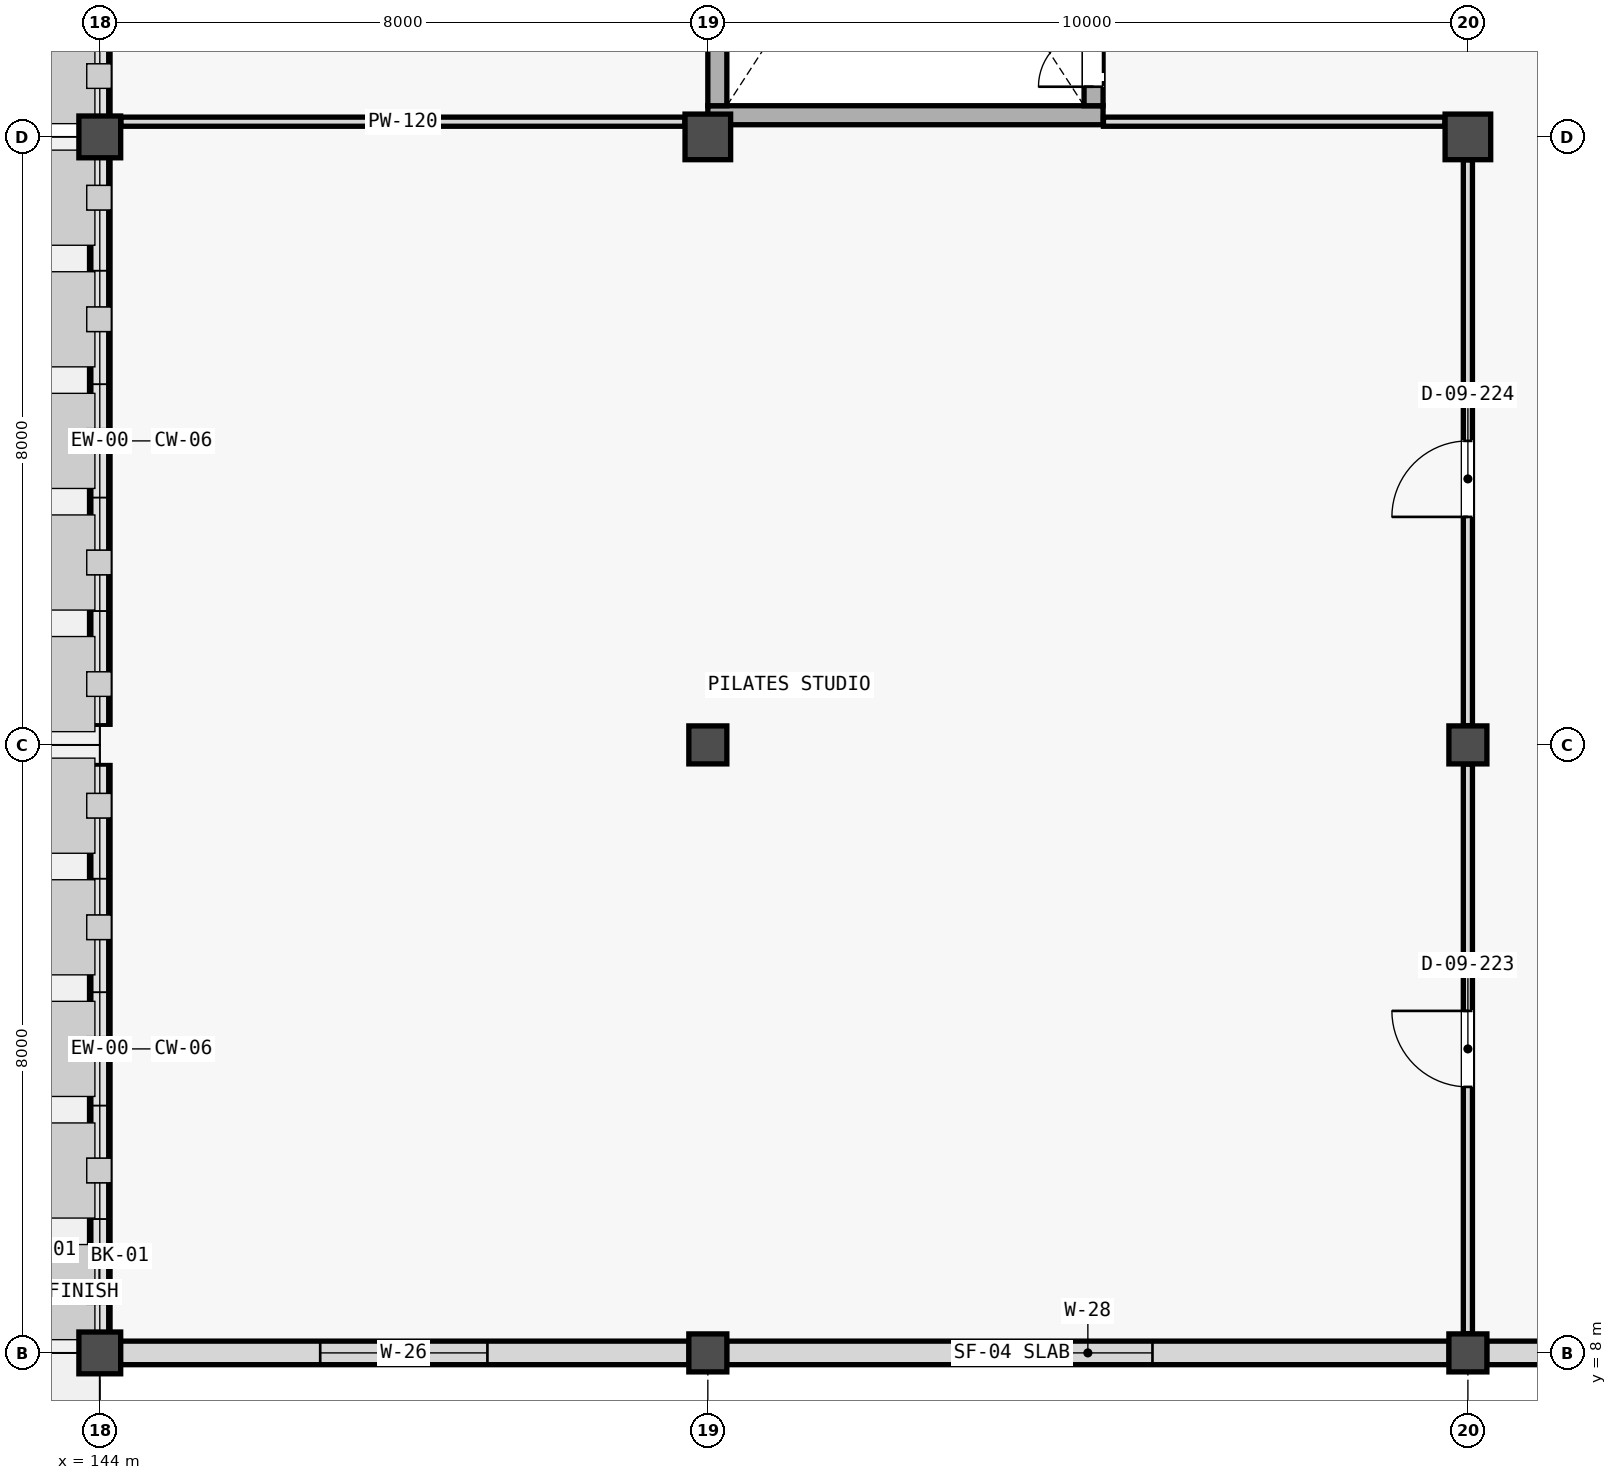
"""IFC4 building model, lengths in metres.
Left out: names, types, materials, properties, quantities, classifications, styles, units other than length and angle.
Written with IfcOpenShell. Run it as: python <this file> out.ifc"""

import sys

from ifc_helpers import new_model, si_unit, direction, frame, frame_2d, origin, origin_2d, place, context, subcontext, project, spatial, rectangle, extrude, element, fill, save


model = new_model("IFC4")
c1 = context("Model", 3, precision=1e-05, world=origin(), true_north=direction((0.0, 1.0)))
c2 = subcontext(c1, "Body", "Model", "MODEL_VIEW")
j1 = project(units=[si_unit("LENGTHUNIT", "METRE"), si_unit("PLANEANGLEUNIT", "RADIAN")], contexts=[c1])
p1 = place(None, origin())
s1 = spatial("IfcSite", under=j1, at=p1, CompositionType="ELEMENT")
p2 = place(p1, origin())
s2 = spatial("IfcBuilding", under=s1, at=p2, CompositionType="ELEMENT")
p3 = place(p2, frame((0.0, 0.0, 10.2)))
s3 = spatial("IfcBuildingStorey", under=s2, at=p3, CompositionType="ELEMENT", Elevation=10.2)
for number, where, z_axis, x_axis in (
    (1, (152.0, 8.0, 0.0), (0.0, 0.0, 1.0), (1.0, 0.0, 0.0)),
    (2, (162.0, 8.0, 0.0), (0.0, 0.0, 1.0), (1.0, 0.0, 0.0)),
):
    element("IfcColumn", number, at=place(p3, frame(where, z_axis=z_axis, x_axis=x_axis)), inside=s3, PredefinedType="COLUMN", context=c2, shape_type="SweptSolid", body=[
        extrude(rectangle(XDim=0.5, YDim=0.5, at=origin_2d()), origin(), (0.0, 0.0, 1.0), 3.99),
    ])
for number, where, z_axis, x_axis in (
    (3, (152.0, 16.0, 0.0), (0.0, 0.0, 1.0), (1.0, 0.0, 0.0)),
    (4, (162.0, 16.0, 0.0), (0.0, 0.0, 1.0), (1.0, 0.0, 0.0)),
):
    element("IfcColumn", number, at=place(p3, frame(where, z_axis=z_axis, x_axis=x_axis)), inside=s3, PredefinedType="COLUMN", context=c2, shape_type="SweptSolid", body=[
        extrude(rectangle(XDim=0.5, YDim=0.5, at=origin_2d()), origin(), (0.0, 0.0, 1.0), 3.96),
    ])
for number, where, z_axis, x_axis in (
    (5, (152.0, 24.0, 0.0), (0.0, 0.0, 1.0), (1.0, 0.0, 0.0)),
    (6, (162.0, 24.0, 0.0), (0.0, 0.0, 1.0), (1.0, 0.0, 0.0)),
):
    element("IfcColumn", number, at=place(p3, frame(where, z_axis=z_axis, x_axis=x_axis)), inside=s3, PredefinedType="COLUMN", context=c2, shape_type="SweptSolid", body=[
        extrude(rectangle(XDim=0.6, YDim=0.6, at=origin_2d()), origin(), (0.0, 0.0, 1.0), 3.96),
    ])
p4 = place(p3, frame((144.0, 8.0, 0.0), z_axis=(0.0, 0.0, 1.0), x_axis=(1.0, 0.0, 0.0)))
e7 = element("IfcColumn", 7, at=p4, inside=s3, PredefinedType="COLUMN", context=c2, shape_type="SweptSolid", body=[
    extrude(rectangle(XDim=0.55, YDim=0.55, at=origin_2d()), origin(), (0.0, 0.0, 1.0), 3.99),
])
p5 = place(p3, frame((144.0, 24.0, 0.0), z_axis=(0.0, 0.0, 1.0), x_axis=(1.0, 0.0, 0.0)))
e8 = element("IfcColumn", 8, at=p5, inside=s3, PredefinedType="COLUMN", context=c2, shape_type="SweptSolid", body=[
    extrude(rectangle(XDim=0.55, YDim=0.55, at=origin_2d()), origin(), (0.0, 0.0, 1.0), 3.96),
])
for number, where, z_axis, x_axis in (
    (9, (144.0, 8.271, 0.0), (0.0, 0.0, 1.0), (0.0, 1.0, 0.0)),
    (10, (144.0, 16.271, 0.0), (0.0, 0.0, 1.0), (0.0, 1.0, 0.0)),
):
    element("IfcWall", number, at=place(p3, frame(where, z_axis=z_axis, x_axis=x_axis)), inside=s3, PredefinedType="STANDARD", context=c2, shape_type="SweptSolid", body=[
        extrude(rectangle(XDim=7.458, YDim=0.27, at=frame_2d((3.729, 0.0))), origin(), (0.0, 0.0, 1.0), 0.8),
    ])
p6 = place(p3, frame((144.0, 24.271, 0.0), z_axis=(0.0, 0.0, 1.0), x_axis=(0.0, 1.0, 0.0)))
e11 = element("IfcWall", 11, at=p6, inside=s3, PredefinedType="STANDARD", context=c2, shape_type="SweptSolid", body=[
    extrude(rectangle(XDim=7.483, YDim=0.27, at=frame_2d((3.741, 0.0))), origin(), (0.0, 0.0, 1.0), 0.8),
])
p7 = place(p3, frame((144.271, 8.0, 0.0), z_axis=(0.0, 0.0, 1.0), x_axis=(1.0, 0.0, 0.0)))
e12 = element("IfcWall", 12, at=p7, inside=s3, PredefinedType="STANDARD", context=c2, shape_type="SweptSolid", body=[
    extrude(rectangle(XDim=7.483, YDim=0.31, at=frame_2d((3.741, 0.0))), origin(), (0.0, 0.0, 1.0), 3.15),
])
p8 = place(p7, frame((2.629, 0.0, 0.95)))
e13 = element("IfcOpeningElement", 13, at=p8, cuts=e12, PredefinedType="OPENING", context=c2, shape_type="SweptSolid", body=[
    extrude(rectangle(XDim=2.2, YDim=1.6, at=frame_2d((1.1, 0.8))), frame((0.0, 0.165, 0.0), z_axis=(0.0, -1.0, 0.0), x_axis=(1.0, 0.0, 0.0)), (0.0, 0.0, 1.0), 0.33),
])
p9 = place(p3, frame((152.246, 8.0, 0.0), z_axis=(0.0, 0.0, 1.0), x_axis=(1.0, 0.0, 0.0)))
e14 = element("IfcWall", 14, at=p9, inside=s3, PredefinedType="STANDARD", context=c2, shape_type="SweptSolid", body=[
    extrude(rectangle(XDim=9.508, YDim=0.31, at=frame_2d((4.754, 0.0))), origin(), (0.0, 0.0, 1.0), 3.15),
])
p10 = place(p9, frame((3.904, 0.0, 0.95)))
e15 = element("IfcOpeningElement", 15, at=p10, cuts=e14, PredefinedType="OPENING", context=c2, shape_type="SweptSolid", body=[
    extrude(rectangle(XDim=1.7, YDim=1.35, at=frame_2d((0.85, 0.675))), frame((0.0, 0.165, 0.0), z_axis=(0.0, -1.0, 0.0), x_axis=(1.0, 0.0, 0.0)), (0.0, 0.0, 1.0), 0.33),
])
p11 = place(p3, frame((162.246, 8.0, 0.0), z_axis=(0.0, 0.0, 1.0), x_axis=(1.0, 0.0, 0.0)))
e16 = element("IfcWall", 16, at=p11, inside=s3, PredefinedType="STANDARD", context=c2, shape_type="SweptSolid", body=[
    extrude(rectangle(XDim=5.774, YDim=0.31, at=frame_2d((2.887, 0.0))), origin(), (0.0, 0.0, 1.0), 3.15),
])
p12 = place(p11, frame((0.784, 0.0, 0.95)))
e17 = element("IfcOpeningElement", 17, at=p12, cuts=e16, PredefinedType="OPENING", context=c2, shape_type="SweptSolid", body=[
    extrude(rectangle(XDim=1.0, YDim=1.6, at=frame_2d((0.5, 0.8))), frame((0.0, 0.165, 0.0), z_axis=(0.0, -1.0, 0.0), x_axis=(1.0, 0.0, 0.0)), (0.0, 0.0, 1.0), 0.33),
])
p13 = place(p3, frame((152.0, 24.285, 0.0), z_axis=(0.0, 0.0, 1.0), x_axis=(1.0, 0.0, 0.0)))
e18 = element("IfcWall", 18, at=p13, inside=s3, PredefinedType="SHEAR", context=c2, shape_type="SweptSolid", body=[
    extrude(rectangle(XDim=5.2, YDim=0.25, at=frame_2d((2.6, 0.0))), origin(), (0.0, 0.0, 1.0), 4.2),
])
p14 = place(p3, frame((152.125, 24.41, 0.0), z_axis=(0.0, 0.0, 1.0), x_axis=(0.0, 1.0, 0.0)))
e19 = element("IfcWall", 19, at=p14, inside=s3, PredefinedType="SHEAR", context=c2, shape_type="SweptSolid", body=[
    extrude(rectangle(XDim=7.24, YDim=0.25, at=frame_2d((3.62, 0.0))), origin(), (0.0, 0.0, 1.0), 4.2),
])
p15 = place(p3, frame((157.075, 24.41, 0.0), z_axis=(0.0, 0.0, 1.0), x_axis=(0.0, 1.0, 0.0)))
e20 = element("IfcWall", 20, at=p15, inside=s3, PredefinedType="SHEAR", context=c2, shape_type="SweptSolid", body=[
    extrude(rectangle(XDim=7.24, YDim=0.25, at=frame_2d((3.62, 0.0))), origin(), (0.0, 0.0, 1.0), 4.2),
])
p16 = place(p15, frame((0.25, 0.0, 0.0)))
e21 = element("IfcOpeningElement", 21, at=p16, cuts=e20, PredefinedType="OPENING", context=c2, shape_type="SweptSolid", body=[
    extrude(rectangle(XDim=1.45, YDim=2.2, at=frame_2d((0.725, 1.1))), frame((0.0, 0.135, 0.0), z_axis=(0.0, -1.0, 0.0), x_axis=(1.0, 0.0, 0.0)), (0.0, 0.0, 1.0), 0.27),
])
p17 = place(p3, frame((162.0, 8.252, 0.0), z_axis=(0.0, 0.0, 1.0), x_axis=(0.0, 1.0, 0.0)))
e22 = element("IfcWall", 22, at=p17, inside=s3, PredefinedType="PARTITIONING", context=c2, shape_type="SweptSolid", body=[
    extrude(rectangle(XDim=7.496, YDim=0.12, at=frame_2d((3.748, 0.0))), origin(), (0.0, 0.0, 1.0), 3.24),
])
p18 = place(p17, frame((3.248, 0.0, 0.0)))
e23 = element("IfcOpeningElement", 23, at=p18, cuts=e22, PredefinedType="OPENING", context=c2, shape_type="SweptSolid", body=[
    extrude(rectangle(XDim=1.0, YDim=2.15, at=frame_2d((0.5, 1.075))), frame((0.0, 0.07, 0.0), z_axis=(0.0, -1.0, 0.0), x_axis=(1.0, 0.0, 0.0)), (0.0, 0.0, 1.0), 0.14),
])
p19 = place(p3, frame((162.0, 16.252, 0.0), z_axis=(0.0, 0.0, 1.0), x_axis=(0.0, 1.0, 0.0)))
e24 = element("IfcWall", 24, at=p19, inside=s3, PredefinedType="PARTITIONING", context=c2, shape_type="SweptSolid", body=[
    extrude(rectangle(XDim=7.446, YDim=0.12, at=frame_2d((3.723, 0.0))), origin(), (0.0, 0.0, 1.0), 3.24),
])
p20 = place(p19, frame((2.748, 0.0, 0.0)))
e25 = element("IfcOpeningElement", 25, at=p20, cuts=e24, PredefinedType="OPENING", context=c2, shape_type="SweptSolid", body=[
    extrude(rectangle(XDim=1.0, YDim=2.15, at=frame_2d((0.5, 1.075))), frame((0.0, 0.07, 0.0), z_axis=(0.0, -1.0, 0.0), x_axis=(1.0, 0.0, 0.0)), (0.0, 0.0, 1.0), 0.14),
])
p21 = place(p3, frame((144.277, 24.2, 0.0), z_axis=(0.0, 0.0, 1.0), x_axis=(1.0, 0.0, 0.0)))
e26 = element("IfcWall", 26, at=p21, inside=s3, PredefinedType="PARTITIONING", context=c2, shape_type="SweptSolid", body=[
    extrude(rectangle(XDim=7.421, YDim=0.12, at=frame_2d((3.71, 0.0))), origin(), (0.0, 0.0, 1.0), 3.945),
])
p22 = place(p3, frame((157.205, 24.2, 0.0), z_axis=(0.0, 0.0, 1.0), x_axis=(1.0, 0.0, 0.0)))
e27 = element("IfcWall", 27, at=p22, inside=s3, PredefinedType="PARTITIONING", context=c2, shape_type="SweptSolid", body=[
    extrude(rectangle(XDim=4.493, YDim=0.12, at=frame_2d((2.247, 0.0))), origin(), (0.0, 0.0, 1.0), 3.24),
])
p23 = place(p8, origin())
e28 = element("IfcWindow", 28, at=p23, inside=s3, PartitioningType="SINGLE_PANEL", PredefinedType="WINDOW", context=c2, shape_type="SweptSolid", body=[
    extrude(rectangle(XDim=2.2, YDim=1.6, at=frame_2d((1.1, 0.8))), frame((0.0, 0.03, 0.0), z_axis=(0.0, -1.0, 0.0), x_axis=(1.0, 0.0, 0.0)), (0.0, 0.0, 1.0), 0.06),
])
fill(e13, e28)
p24 = place(p10, origin())
e29 = element("IfcWindow", 29, at=p24, inside=s3, PartitioningType="SINGLE_PANEL", PredefinedType="WINDOW", context=c2, shape_type="SweptSolid", body=[
    extrude(rectangle(XDim=1.7, YDim=1.35, at=frame_2d((0.85, 0.675))), frame((0.0, 0.03, 0.0), z_axis=(0.0, -1.0, 0.0), x_axis=(1.0, 0.0, 0.0)), (0.0, 0.0, 1.0), 0.06),
])
fill(e15, e29)
p25 = place(p16, origin())
e30 = element("IfcDoor", 30, at=p25, inside=s3, OperationType="DOUBLE_DOOR_SINGLE_SWING", PredefinedType="DOOR", context=c2, shape_type="SweptSolid", body=[
    extrude(rectangle(XDim=1.45, YDim=2.2, at=frame_2d((0.725, 1.1))), frame((0.0, 0.025, 0.0), z_axis=(0.0, -1.0, 0.0), x_axis=(1.0, 0.0, 0.0)), (0.0, 0.0, 1.0), 0.05),
])
fill(e21, e30)
p26 = place(p18, origin())
e31 = element("IfcDoor", 31, at=p26, inside=s3, OperationType="SINGLE_SWING_RIGHT", PredefinedType="DOOR", context=c2, shape_type="SweptSolid", body=[
    extrude(rectangle(XDim=1.0, YDim=2.15, at=frame_2d((0.5, 1.075))), frame((0.0, 0.025, 0.0), z_axis=(0.0, -1.0, 0.0), x_axis=(1.0, 0.0, 0.0)), (0.0, 0.0, 1.0), 0.05),
])
fill(e23, e31)
p27 = place(p20, origin())
e32 = element("IfcDoor", 32, at=p27, inside=s3, OperationType="SINGLE_SWING_LEFT", PredefinedType="DOOR", context=c2, shape_type="SweptSolid", body=[
    extrude(rectangle(XDim=1.0, YDim=2.15, at=frame_2d((0.5, 1.075))), frame((0.0, 0.025, 0.0), z_axis=(0.0, -1.0, 0.0), x_axis=(1.0, 0.0, 0.0)), (0.0, 0.0, 1.0), 0.05),
])
fill(e25, e32)
save(model, sys.argv[1])
